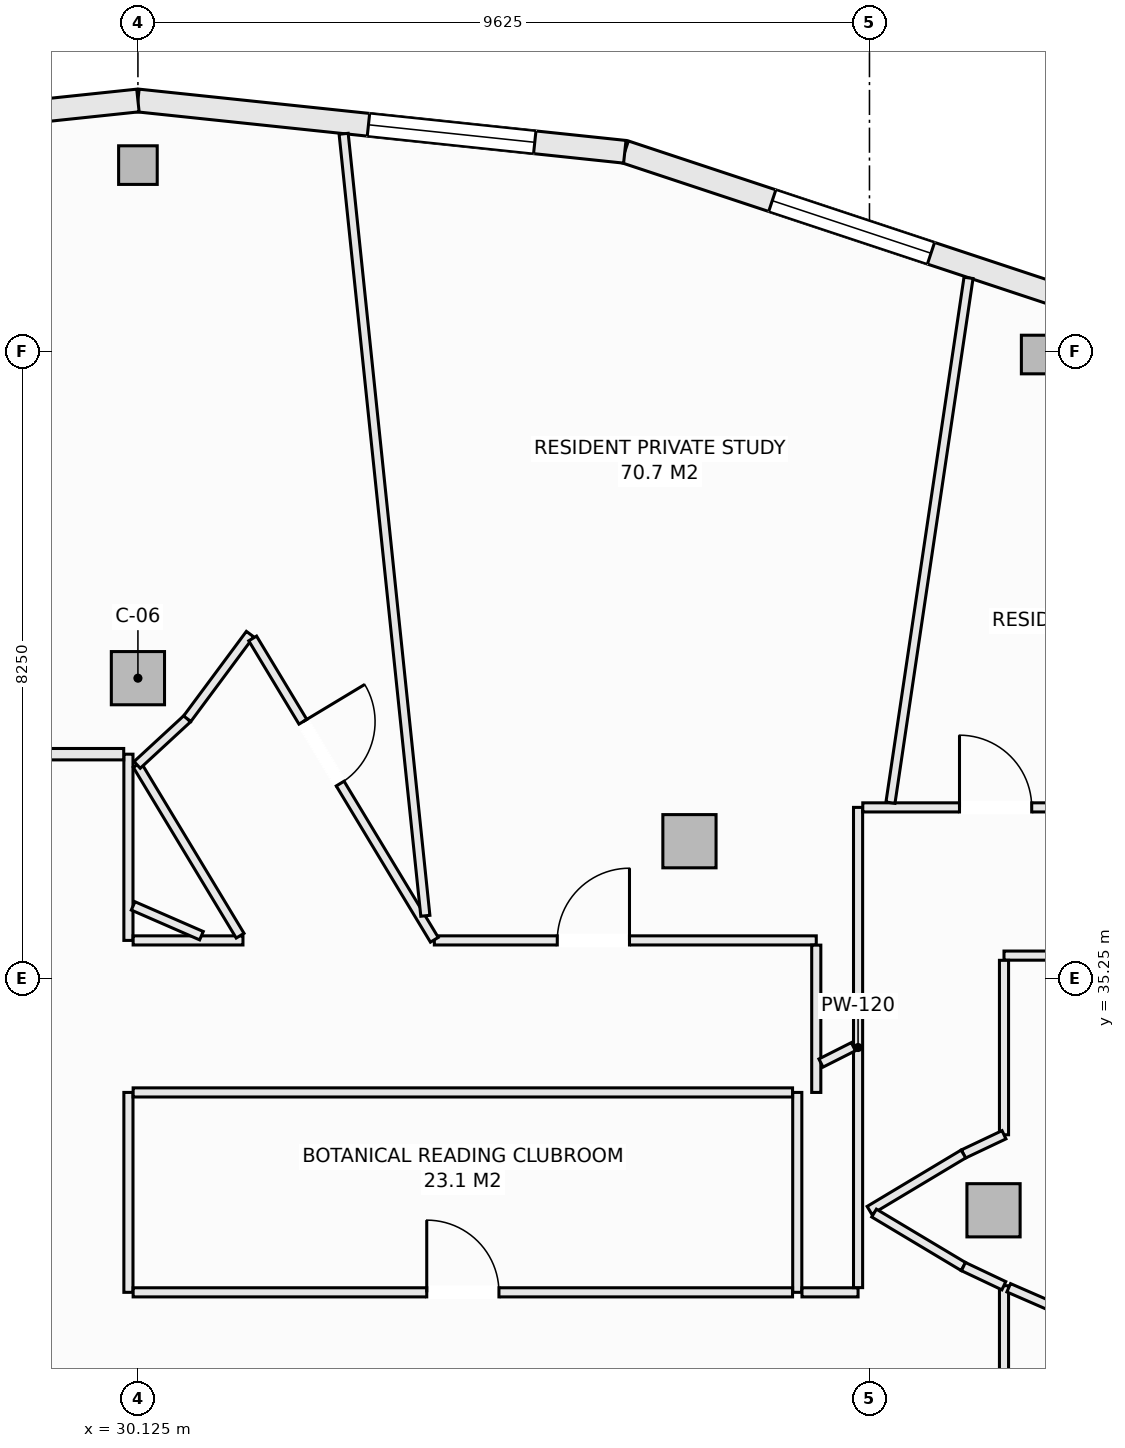
"""IFC4 building model, lengths in metres.
Left out: names, types, materials, properties, quantities, classifications, styles, units other than length and angle.
Written with IfcOpenShell. Run it as: python <this file> out.ifc"""

import sys

from ifc_helpers import new_model, si_unit, direction, frame, frame_2d, origin, origin_2d, place, context, subcontext, project, spatial, rectangle, hollow_rectangle, extrude, element, fill, save


model = new_model("IFC4")
c1 = context("Model", 3, precision=1e-05, world=origin(), true_north=direction((0.0, 1.0)))
c2 = subcontext(c1, "Body", "Model", "MODEL_VIEW")
j1 = project(units=[si_unit("LENGTHUNIT", "METRE"), si_unit("PLANEANGLEUNIT", "RADIAN")], contexts=[c1])
p1 = place(None, origin())
s1 = spatial("IfcSite", under=j1, at=p1, CompositionType="ELEMENT")
p2 = place(p1, origin())
s2 = spatial("IfcBuilding", under=s1, at=p2, CompositionType="ELEMENT")
p3 = place(p2, frame((0.0, 0.0, 232.7)))
s3 = spatial("IfcBuildingStorey", under=s2, at=p3, CompositionType="ELEMENT", Elevation=232.7)
for number, where, z_axis, x_axis in (
    (1, (42.003, 43.458, -0.27), (0.0, 0.0, 1.0), (1.0, 0.0, 0.0)),
    (2, (30.125, 45.95, -0.27), (0.0, 0.0, 1.0), (1.0, 0.0, 0.0)),
):
    element("IfcColumn", number, at=place(p3, frame(where, z_axis=z_axis, x_axis=x_axis)), inside=s3, PredefinedType="COLUMN", context=c2, shape_type="SweptSolid", body=[
        extrude(hollow_rectangle(XDim=0.508, YDim=0.508, WallThickness=0.019, at=origin_2d()), origin(), (0.0, 0.0, 1.0), 3.3),
    ])
for number, where, z_axis, x_axis in (
    (3, (41.382, 32.199, -0.27), (0.0, 0.0, 1.0), (1.0, 0.0, 0.0)),
    (4, (37.382, 37.055, -0.27), (0.0, 0.0, 1.0), (1.0, 0.0, 0.0)),
    (5, (30.125, 39.2, -0.27), (0.0, 0.0, 1.0), (1.0, 0.0, 0.0)),
):
    element("IfcColumn", number, at=place(p3, frame(where, z_axis=z_axis, x_axis=x_axis)), inside=s3, PredefinedType="COLUMN", context=c2, shape_type="SweptSolid", body=[
        extrude(rectangle(XDim=0.7, YDim=0.7, at=origin_2d()), origin(), (0.0, 0.0, 1.0), 3.3),
    ])
p4 = place(p3, frame((36.531, 46.125, 0.0), z_axis=(0.0, 0.0, 1.0), x_axis=(0.949240877604, -0.314550085495, 0.0)))
e6 = element("IfcWall", 6, at=p4, inside=s3, PredefinedType="SOLIDWALL", context=c2, shape_type="SweptSolid", body=[
    extrude(rectangle(XDim=6.288, YDim=0.3, at=frame_2d((3.144, 0.0))), origin(), (0.0, 0.0, 1.0), 2.605),
])
p5 = place(p4, frame((2.044, 0.0, 0.72)))
e7 = element("IfcOpeningElement", 7, at=p5, cuts=e6, PredefinedType="OPENING", context=c2, shape_type="SweptSolid", body=[
    extrude(rectangle(XDim=2.2, YDim=1.65, at=frame_2d((1.1, 0.825))), frame((0.0, 0.16, 0.0), z_axis=(0.0, -1.0, 0.0), x_axis=(1.0, 0.0, 0.0)), (0.0, 0.0, 1.0), 0.32),
])
p6 = place(p3, frame((30.125, 46.8, 0.0), z_axis=(0.0, 0.0, 1.0), x_axis=(0.994497142298, -0.104763705363, 0.0)))
e8 = element("IfcWall", 8, at=p6, inside=s3, PredefinedType="SOLIDWALL", context=c2, shape_type="SweptSolid", body=[
    extrude(rectangle(XDim=6.441, YDim=0.3, at=frame_2d((3.221, 0.0))), origin(), (0.0, 0.0, 1.0), 2.605),
])
p7 = place(p6, frame((3.05, 0.0, 0.72)))
e9 = element("IfcOpeningElement", 9, at=p7, cuts=e8, PredefinedType="OPENING", context=c2, shape_type="SweptSolid", body=[
    extrude(rectangle(XDim=2.2, YDim=1.65, at=frame_2d((1.1, 0.825))), frame((0.0, 0.16, 0.0), z_axis=(0.0, -1.0, 0.0), x_axis=(1.0, 0.0, 0.0)), (0.0, 0.0, 1.0), 0.32),
])
p8 = place(p3, frame((23.719, 46.125, 0.0), z_axis=(0.0, 0.0, 1.0), x_axis=(0.994497142298, 0.104763705363, 0.0)))
e10 = element("IfcWall", 10, at=p8, inside=s3, PredefinedType="SOLIDWALL", context=c2, shape_type="SweptSolid", body=[
    extrude(rectangle(XDim=6.441, YDim=0.3, at=frame_2d((3.221, 0.0))), origin(), (0.0, 0.0, 1.0), 2.605),
])
p9 = place(p8, frame((2.121, 0.0, 0.72)))
e11 = element("IfcOpeningElement", 11, at=p9, cuts=e10, PredefinedType="OPENING", context=c2, shape_type="SweptSolid", body=[
    extrude(rectangle(XDim=2.2, YDim=1.65, at=frame_2d((1.1, 0.825))), frame((0.0, 0.16, 0.0), z_axis=(0.0, -1.0, 0.0), x_axis=(1.0, 0.0, 0.0)), (0.0, 0.0, 1.0), 0.32),
])
p10 = place(p3, frame((30.0, 31.12, 0.0), z_axis=(0.0, 0.0, 1.0), x_axis=(0.0, 1.0, 0.0)))
e12 = element("IfcWall", 12, at=p10, inside=s3, PredefinedType="PARTITIONING", context=c2, shape_type="SweptSolid", body=[
    extrude(rectangle(XDim=2.63, YDim=0.12, at=frame_2d((1.315, 0.0))), origin(), (0.0, 0.0, 1.0), 3.03),
])
p11 = place(p3, frame((30.0, 35.75, 0.0), z_axis=(0.0, 0.0, 1.0), x_axis=(0.0, 1.0, 0.0)))
e13 = element("IfcWall", 13, at=p11, inside=s3, PredefinedType="PARTITIONING", context=c2, shape_type="SweptSolid", body=[
    extrude(rectangle(XDim=2.45, YDim=0.12, at=frame_2d((1.225, 0.0))), origin(), (0.0, 0.0, 1.0), 3.03),
])
p12 = place(p3, frame((38.8, 31.12, 0.0), z_axis=(0.0, 0.0, 1.0), x_axis=(0.0, 1.0, 0.0)))
e14 = element("IfcWall", 14, at=p12, inside=s3, PredefinedType="PARTITIONING", context=c2, shape_type="SweptSolid", body=[
    extrude(rectangle(XDim=2.63, YDim=0.12, at=frame_2d((1.315, 0.0))), origin(), (0.0, 0.0, 1.0), 3.03),
])
p13 = place(p3, frame((30.062, 31.12, 0.0), z_axis=(0.0, 0.0, 1.0), x_axis=(1.0, 0.0, 0.0)))
e15 = element("IfcWall", 15, at=p13, inside=s3, PredefinedType="PARTITIONING", context=c2, shape_type="SweptSolid", body=[
    extrude(rectangle(XDim=8.676, YDim=0.12, at=frame_2d((4.338, 0.0))), origin(), (0.0, 0.0, 1.0), 3.03),
])
p14 = place(p13, frame((3.863, 0.0, 0.0)))
e16 = element("IfcOpeningElement", 16, at=p14, cuts=e15, PredefinedType="OPENING", context=c2, shape_type="SweptSolid", body=[
    extrude(rectangle(XDim=0.95, YDim=2.1, at=frame_2d((0.475, 1.05))), frame((0.0, 0.07, 0.0), z_axis=(0.0, -1.0, 0.0), x_axis=(1.0, 0.0, 0.0)), (0.0, 0.0, 1.0), 0.14),
])
p15 = place(p3, frame((38.862, 31.12, 0.0), z_axis=(0.0, 0.0, 1.0), x_axis=(1.0, 0.0, 0.0)))
e17 = element("IfcWall", 17, at=p15, inside=s3, PredefinedType="PARTITIONING", context=c2, shape_type="SweptSolid", body=[
    extrude(rectangle(XDim=0.738, YDim=0.12, at=frame_2d((0.369, 0.0))), origin(), (0.0, 0.0, 1.0), 3.03),
])
p16 = place(p3, frame((30.062, 33.75, 0.0), z_axis=(0.0, 0.0, 1.0), x_axis=(1.0, 0.0, 0.0)))
e18 = element("IfcWall", 18, at=p16, inside=s3, PredefinedType="PARTITIONING", context=c2, shape_type="SweptSolid", body=[
    extrude(rectangle(XDim=8.676, YDim=0.12, at=frame_2d((4.338, 0.0))), origin(), (0.0, 0.0, 1.0), 3.03),
])
p17 = place(p3, frame((27.227, 38.2, 0.0), z_axis=(0.0, 0.0, 1.0), x_axis=(1.0, 0.0, 0.0)))
e19 = element("IfcWall", 19, at=p17, inside=s3, PredefinedType="PARTITIONING", context=c2, shape_type="SweptSolid", body=[
    extrude(rectangle(XDim=2.711, YDim=0.15, at=frame_2d((1.355, 0.0))), origin(), (0.0, 0.0, 1.0), 3.03),
])
p18 = place(p3, frame((30.062, 35.75, 0.0), z_axis=(0.0, 0.0, 1.0), x_axis=(1.0, 0.0, 0.0)))
e20 = element("IfcWall", 20, at=p18, inside=s3, PredefinedType="PARTITIONING", context=c2, shape_type="SweptSolid", body=[
    extrude(rectangle(XDim=1.445, YDim=0.12, at=frame_2d((0.723, 0.0))), origin(), (0.0, 0.0, 1.0), 3.03),
])
p19 = place(p3, frame((34.025, 35.75, 0.0), z_axis=(0.0, 0.0, 1.0), x_axis=(1.0, 0.0, 0.0)))
e21 = element("IfcWall", 21, at=p19, inside=s3, PredefinedType="PARTITIONING", context=c2, shape_type="SweptSolid", body=[
    extrude(rectangle(XDim=5.025, YDim=0.12, at=frame_2d((2.513, 0.0))), origin(), (0.0, 0.0, 1.0), 2.478),
])
p20 = place(p19, frame((1.617, 0.0, 0.0)))
e22 = element("IfcOpeningElement", 22, at=p20, cuts=e21, PredefinedType="OPENING", context=c2, shape_type="SweptSolid", body=[
    extrude(rectangle(XDim=0.95, YDim=2.1, at=frame_2d((0.475, 1.05))), frame((0.0, 0.07, 0.0), z_axis=(0.0, -1.0, 0.0), x_axis=(1.0, 0.0, 0.0)), (0.0, 0.0, 1.0), 0.14),
])
p21 = place(p3, frame((30.115, 38.059, 0.0), z_axis=(0.0, 0.0, 1.0), x_axis=(0.516246227887, -0.85644020935, 0.0)))
e23 = element("IfcWall", 23, at=p21, inside=s3, PredefinedType="PARTITIONING", context=c2, shape_type="SweptSolid", body=[
    extrude(rectangle(XDim=2.624, YDim=0.12, at=frame_2d((1.312, 0.0))), origin(), (0.0, 0.0, 1.0), 3.03),
])
p22 = place(p3, frame((30.115, 38.059, 0.0), z_axis=(0.0, 0.0, 1.0), x_axis=(0.734991343239, 0.678076489316, 0.0)))
e24 = element("IfcWall", 24, at=p22, inside=s3, PredefinedType="PARTITIONING", context=c2, shape_type="SweptSolid", body=[
    extrude(rectangle(XDim=0.896, YDim=0.12, at=frame_2d((0.448, 0.0))), origin(), (0.0, 0.0, 1.0), 3.03),
])
p23 = place(p3, frame((30.774, 38.667, 0.0), z_axis=(0.0, 0.0, 1.0), x_axis=(0.596019138224, 0.802970227885, 0.0)))
e25 = element("IfcWall", 25, at=p23, inside=s3, PredefinedType="PARTITIONING", context=c2, shape_type="SweptSolid", body=[
    extrude(rectangle(XDim=1.386, YDim=0.12, at=frame_2d((0.693, 0.0))), origin(), (0.0, 0.0, 1.0), 3.03),
])
p24 = place(p3, frame((31.635, 39.723, 0.0), z_axis=(0.0, 0.0, 1.0), x_axis=(0.516340331217, -0.856383478565, 0.0)))
e26 = element("IfcWall", 26, at=p24, inside=s3, PredefinedType="PARTITIONING", context=c2, shape_type="SweptSolid", body=[
    extrude(rectangle(XDim=4.629, YDim=0.12, at=frame_2d((2.315, 0.0))), origin(), (0.0, 0.0, 1.0), 3.03),
])
p25 = place(p24, frame((1.28, 0.0, 0.0)))
e27 = element("IfcOpeningElement", 27, at=p25, cuts=e26, PredefinedType="OPENING", context=c2, shape_type="SweptSolid", body=[
    extrude(rectangle(XDim=0.95, YDim=2.1, at=frame_2d((0.475, 1.05))), frame((0.0, 0.07, 0.0), z_axis=(0.0, -1.0, 0.0), x_axis=(1.0, 0.0, 0.0)), (0.0, 0.0, 1.0), 0.14),
])
p26 = place(p3, frame((39.05, 33.75, 0.0), z_axis=(0.0, 0.0, 1.0), x_axis=(0.0, 1.0, 0.0)))
e28 = element("IfcWall", 28, at=p26, inside=s3, PredefinedType="PARTITIONING", context=c2, shape_type="SweptSolid", body=[
    extrude(rectangle(XDim=1.938, YDim=0.12, at=frame_2d((0.969, 0.0))), origin(), (0.0, 0.0, 1.0), 3.03),
])
p27 = place(p3, frame((39.6, 31.182, 0.0), z_axis=(0.0, 0.0, 1.0), x_axis=(0.0, 1.0, 0.0)))
e29 = element("IfcWall", 29, at=p27, inside=s3, PredefinedType="PARTITIONING", context=c2, shape_type="SweptSolid", body=[
    extrude(rectangle(XDim=6.318, YDim=0.12, at=frame_2d((3.159, 0.0))), origin(), (0.0, 0.0, 1.0), 3.03),
])
p28 = place(p3, frame((39.662, 37.5, 0.0), z_axis=(0.0, 0.0, 1.0), x_axis=(1.0, 0.0, 0.0)))
e30 = element("IfcWall", 30, at=p28, inside=s3, PredefinedType="PARTITIONING", context=c2, shape_type="SweptSolid", body=[
    extrude(rectangle(XDim=3.495, YDim=0.12, at=frame_2d((1.748, 0.0))), origin(), (0.0, 0.0, 1.0), 2.77),
])
p29 = place(p28, frame((1.272, 0.0, 0.0)))
e31 = element("IfcOpeningElement", 31, at=p29, cuts=e30, PredefinedType="OPENING", context=c2, shape_type="SweptSolid", body=[
    extrude(rectangle(XDim=0.95, YDim=2.1, at=frame_2d((0.475, 1.05))), frame((0.0, 0.07, 0.0), z_axis=(0.0, -1.0, 0.0), x_axis=(1.0, 0.0, 0.0)), (0.0, 0.0, 1.0), 0.14),
])
p30 = place(p3, frame((41.52, 35.55, 0.0), z_axis=(0.0, 0.0, 1.0), x_axis=(1.0, 0.0, 0.0)))
e32 = element("IfcWall", 32, at=p30, inside=s3, PredefinedType="PARTITIONING", context=c2, shape_type="SweptSolid", body=[
    extrude(rectangle(XDim=3.085, YDim=0.12, at=frame_2d((1.542, 0.0))), origin(), (0.0, 0.0, 1.0), 3.03),
])
p31 = place(p30, frame((1.068, 0.0, 0.0)))
e33 = element("IfcOpeningElement", 33, at=p31, cuts=e32, PredefinedType="OPENING", context=c2, shape_type="SweptSolid", body=[
    extrude(rectangle(XDim=0.95, YDim=2.1, at=frame_2d((0.475, 1.05))), frame((0.0, 0.07, 0.0), z_axis=(0.0, -1.0, 0.0), x_axis=(1.0, 0.0, 0.0)), (0.0, 0.0, 1.0), 0.14),
])
p32 = place(p3, frame((41.52, 22.794, 0.0), z_axis=(0.0, 0.0, 1.0), x_axis=(0.0, 1.0, 0.0)))
e34 = element("IfcWall", 34, at=p32, inside=s3, PredefinedType="PARTITIONING", context=c2, shape_type="SweptSolid", body=[
    extrude(rectangle(XDim=8.413, YDim=0.12, at=frame_2d((4.207, 0.0))), origin(), (0.0, 0.0, 1.0), 2.478),
])
p33 = place(p32, frame((2.471, 0.0, 0.0)))
e35 = element("IfcOpeningElement", 35, at=p33, cuts=e34, PredefinedType="OPENING", context=c2, shape_type="SweptSolid", body=[
    extrude(rectangle(XDim=0.95, YDim=2.1, at=frame_2d((0.475, 1.05))), frame((0.0, 0.07, 0.0), z_axis=(0.0, -1.0, 0.0), x_axis=(1.0, 0.0, 0.0)), (0.0, 0.0, 1.0), 0.14),
])
p34 = place(p3, frame((41.52, 33.193, 0.0), z_axis=(0.0, 0.0, 1.0), x_axis=(0.0, 1.0, 0.0)))
e36 = element("IfcWall", 36, at=p34, inside=s3, PredefinedType="PARTITIONING", context=c2, shape_type="SweptSolid", body=[
    extrude(rectangle(XDim=2.295, YDim=0.12, at=frame_2d((1.147, 0.0))), origin(), (0.0, 0.0, 1.0), 3.03),
])
p35 = place(p3, frame((40.986, 32.94, 0.0), z_axis=(0.0, 0.0, 1.0), x_axis=(0.90356951601, 0.428441512621, 0.0)))
e37 = element("IfcWall", 37, at=p35, inside=s3, PredefinedType="PARTITIONING", context=c2, shape_type="SweptSolid", body=[
    extrude(rectangle(XDim=0.591, YDim=0.12, at=frame_2d((0.295, 0.0))), origin(), (0.0, 0.0, 1.0), 3.03),
])
p36 = place(p3, frame((39.75, 32.199, 0.0), z_axis=(0.0, 0.0, 1.0), x_axis=(0.857702120906, 0.514146935996, 0.0)))
e38 = element("IfcWall", 38, at=p36, inside=s3, PredefinedType="PARTITIONING", context=c2, shape_type="SweptSolid", body=[
    extrude(rectangle(XDim=1.441, YDim=0.12, at=frame_2d((0.721, 0.0))), origin(), (0.0, 0.0, 1.0), 3.03),
])
p37 = place(p3, frame((39.81, 32.163, 0.0), z_axis=(0.0, 0.0, 1.0), x_axis=(0.858011245414, -0.513630901273, 0.0)))
e39 = element("IfcWall", 39, at=p37, inside=s3, PredefinedType="PARTITIONING", context=c2, shape_type="SweptSolid", body=[
    extrude(rectangle(XDim=1.37, YDim=0.12, at=frame_2d((0.685, 0.0))), origin(), (0.0, 0.0, 1.0), 3.03),
])
p38 = place(p3, frame((40.986, 31.459, 0.0), z_axis=(0.0, 0.0, 1.0), x_axis=(0.903687141457, -0.428193356283, 0.0)))
e40 = element("IfcWall", 40, at=p38, inside=s3, PredefinedType="PARTITIONING", context=c2, shape_type="SweptSolid", body=[
    extrude(rectangle(XDim=0.588, YDim=0.12, at=frame_2d((0.294, 0.0))), origin(), (0.0, 0.0, 1.0), 3.03),
])
p39 = place(p3, frame((30.062, 36.204, 0.0), z_axis=(0.0, 0.0, 1.0), x_axis=(0.916602414635, -0.39979996684, 0.0)))
e41 = element("IfcWall", 41, at=p39, inside=s3, PredefinedType="PARTITIONING", context=c2, shape_type="SweptSolid", body=[
    extrude(rectangle(XDim=0.981, YDim=0.12, at=frame_2d((0.49, 0.0))), origin(), (0.0, 0.0, 1.0), 3.03),
])
p40 = place(p3, frame((41.582, 31.18, 0.0), z_axis=(0.0, 0.0, 1.0), x_axis=(0.916624100851, -0.399750244202, 0.0)))
e42 = element("IfcWall", 42, at=p40, inside=s3, PredefinedType="PARTITIONING", context=c2, shape_type="SweptSolid", body=[
    extrude(rectangle(XDim=14.074, YDim=0.12, at=frame_2d((7.037, 0.0))), origin(), (0.0, 0.0, 1.0), 2.478),
])
p41 = place(p3, frame((39.112, 34.137, 0.0), z_axis=(0.0, 0.0, 1.0), x_axis=(0.892681104984, 0.450688855869, 0.0)))
e43 = element("IfcWall", 43, at=p41, inside=s3, PredefinedType="PARTITIONING", context=c2, shape_type="SweptSolid", body=[
    extrude(rectangle(XDim=0.477, YDim=0.12, at=frame_2d((0.239, 0.0))), origin(), (0.0, 0.0, 1.0), 3.03),
])
p42 = place(p3, frame((40.026, 37.562, 0.0), z_axis=(0.0, 0.0, 1.0), x_axis=(0.147138038827, 0.989115967685, 0.0)))
e44 = element("IfcWall", 44, at=p42, inside=s3, PredefinedType="PARTITIONING", context=c2, shape_type="SweptSolid", body=[
    extrude(rectangle(XDim=6.98, YDim=0.12, at=frame_2d((3.49, 0.0))), origin(), (0.0, 0.0, 1.0), 2.478),
])
p43 = place(p3, frame((32.832, 46.362, 0.0), z_axis=(0.0, 0.0, 1.0), x_axis=(0.103942686354, -0.994583288595, 0.0)))
e45 = element("IfcWall", 45, at=p43, inside=s3, PredefinedType="PARTITIONING", context=c2, shape_type="SweptSolid", body=[
    extrude(rectangle(XDim=10.344, YDim=0.12, at=frame_2d((5.172, 0.0))), origin(), (0.0, 0.0, 1.0), 2.77),
])
p44 = place(p5, origin())
e46 = element("IfcWindow", 46, at=p44, inside=s3, PartitioningType="SINGLE_PANEL", PredefinedType="WINDOW", context=c2, shape_type="SweptSolid", body=[
    extrude(rectangle(XDim=2.2, YDim=1.65, at=frame_2d((1.1, 0.825))), frame((0.0, 0.03, 0.0), z_axis=(0.0, -1.0, 0.0), x_axis=(1.0, 0.0, 0.0)), (0.0, 0.0, 1.0), 0.06),
])
fill(e7, e46)
p45 = place(p7, origin())
e47 = element("IfcWindow", 47, at=p45, inside=s3, PartitioningType="SINGLE_PANEL", PredefinedType="WINDOW", context=c2, shape_type="SweptSolid", body=[
    extrude(rectangle(XDim=2.2, YDim=1.65, at=frame_2d((1.1, 0.825))), frame((0.0, 0.03, 0.0), z_axis=(0.0, -1.0, 0.0), x_axis=(1.0, 0.0, 0.0)), (0.0, 0.0, 1.0), 0.06),
])
fill(e9, e47)
p46 = place(p14, origin())
e48 = element("IfcDoor", 48, at=p46, inside=s3, OperationType="SINGLE_SWING_LEFT", PredefinedType="DOOR", context=c2, shape_type="SweptSolid", body=[
    extrude(rectangle(XDim=0.95, YDim=2.1, at=frame_2d((0.475, 1.05))), frame((0.0, 0.025, 0.0), z_axis=(0.0, -1.0, 0.0), x_axis=(1.0, 0.0, 0.0)), (0.0, 0.0, 1.0), 0.05),
])
fill(e16, e48)
p47 = place(p29, origin())
e49 = element("IfcDoor", 49, at=p47, inside=s3, OperationType="SINGLE_SWING_LEFT", PredefinedType="DOOR", context=c2, shape_type="SweptSolid", body=[
    extrude(rectangle(XDim=0.95, YDim=2.1, at=frame_2d((0.475, 1.05))), frame((0.0, 0.025, 0.0), z_axis=(0.0, -1.0, 0.0), x_axis=(1.0, 0.0, 0.0)), (0.0, 0.0, 1.0), 0.05),
])
fill(e31, e49)
p48 = place(p20, origin())
e50 = element("IfcDoor", 50, at=p48, inside=s3, OperationType="SINGLE_SWING_RIGHT", PredefinedType="DOOR", context=c2, shape_type="SweptSolid", body=[
    extrude(rectangle(XDim=0.95, YDim=2.1, at=frame_2d((0.475, 1.05))), frame((0.0, 0.025, 0.0), z_axis=(0.0, -1.0, 0.0), x_axis=(1.0, 0.0, 0.0)), (0.0, 0.0, 1.0), 0.05),
])
fill(e22, e50)
p49 = place(p25, origin())
e51 = element("IfcDoor", 51, at=p49, inside=s3, OperationType="SINGLE_SWING_LEFT", PredefinedType="DOOR", context=c2, shape_type="SweptSolid", body=[
    extrude(rectangle(XDim=0.95, YDim=2.1, at=frame_2d((0.475, 1.05))), frame((0.0, 0.025, 0.0), z_axis=(0.0, -1.0, 0.0), x_axis=(1.0, 0.0, 0.0)), (0.0, 0.0, 1.0), 0.05),
])
fill(e27, e51)
save(model, sys.argv[1])
